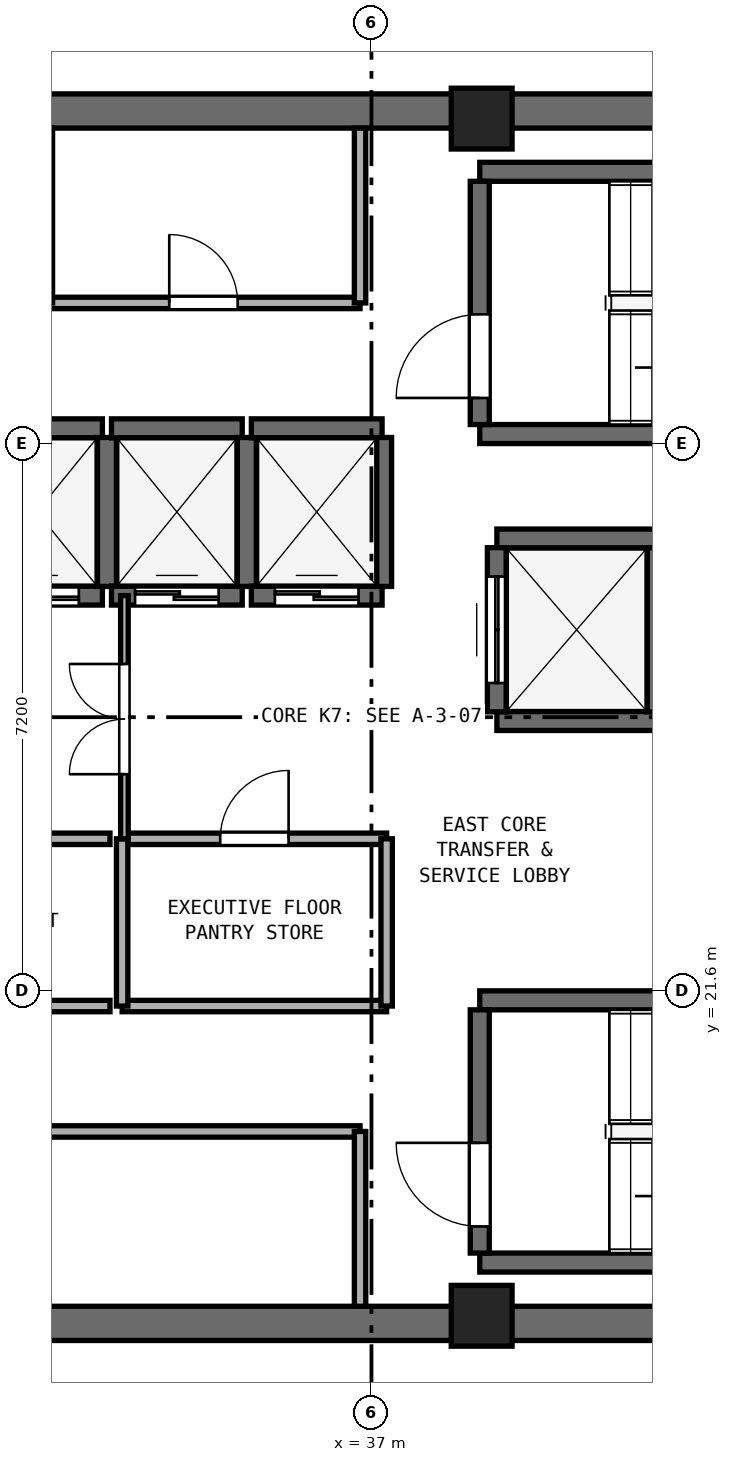
"""IFC4 building model, lengths in metres.
Left out: names, types, materials, properties, quantities, classifications, styles, units other than length and angle.
Written with IfcOpenShell. Run it as: python <this file> out.ifc"""

import sys

from ifc_helpers import new_model, si_unit, direction, frame, frame_2d, origin, origin_2d, place, context, subcontext, project, spatial, rectangle, extrude, element, fill, save


model = new_model("IFC4")
c1 = context("Model", 3, precision=1e-05, world=origin(), true_north=direction((0.0, 1.0)))
c2 = subcontext(c1, "Body", "Model", "MODEL_VIEW")
j1 = project(units=[si_unit("LENGTHUNIT", "METRE"), si_unit("PLANEANGLEUNIT", "RADIAN")], contexts=[c1])
p1 = place(None, origin())
s1 = spatial("IfcSite", under=j1, at=p1, CompositionType="ELEMENT")
p2 = place(p1, origin())
s2 = spatial("IfcBuilding", under=s1, at=p2, CompositionType="ELEMENT")
p3 = place(p2, frame((0.0, 0.0, 251.6)))
s3 = spatial("IfcBuildingStorey", under=s2, at=p3, CompositionType="ELEMENT", Elevation=251.6)
for number, where, z_axis, x_axis in (
    (1, (25.4, 17.225, 0.0), (0.0, 0.0, 1.0), (1.0, 0.0, 0.0)),
    (2, (25.4, 33.175, 0.0), (0.0, 0.0, 1.0), (1.0, 0.0, 0.0)),
):
    element("IfcWall", number, at=place(p3, frame(where, z_axis=z_axis, x_axis=x_axis)), inside=s3, PredefinedType="SHEAR", context=c2, shape_type="SweptSolid", body=[
        extrude(rectangle(XDim=23.2, YDim=0.45, at=frame_2d((11.6, 0.0))), origin(), (0.0, 0.0, 1.0), 3.51),
    ])
for number, where, z_axis, x_axis in (
    (3, (38.45, 17.325, 0.0), (0.0, 0.0, 1.0), (1.0, 0.0, 0.0)),
    (4, (38.45, 33.075, 0.0), (0.0, 0.0, 1.0), (1.0, 0.0, 0.0)),
):
    element("IfcColumn", number, at=place(p3, frame(where, z_axis=z_axis, x_axis=x_axis)), inside=s3, PredefinedType="PILASTER", context=c2, shape_type="SweptSolid", body=[
        extrude(rectangle(XDim=0.8, YDim=0.8, at=origin_2d()), origin(), (0.0, 0.0, 1.0), 3.8),
    ])
for number, where, z_axis, x_axis in (
    (5, (38.425, 28.925, 0.0), (0.0, 0.0, 1.0), (1.0, 0.0, 0.0)),
    (6, (38.425, 32.375, 0.0), (0.0, 0.0, 1.0), (1.0, 0.0, 0.0)),
):
    element("IfcWall", number, at=place(p3, frame(where, z_axis=z_axis, x_axis=x_axis)), inside=s3, PredefinedType="SHEAR", context=c2, shape_type="SweptSolid", body=[
        extrude(rectangle(XDim=7.3, YDim=0.25, at=frame_2d((3.65, 0.0))), origin(), (0.0, 0.0, 1.0), 3.51),
    ])
p4 = place(p3, frame((38.425, 29.05, 0.0), z_axis=(0.0, 0.0, 1.0), x_axis=(0.0, 1.0, 0.0)))
e7 = element("IfcWall", 7, at=p4, inside=s3, PredefinedType="SHEAR", context=c2, shape_type="SweptSolid", body=[
    extrude(rectangle(XDim=3.2, YDim=0.25, at=frame_2d((1.6, 0.0))), origin(), (0.0, 0.0, 1.0), 3.51),
])
p5 = place(p4, frame((0.35, 0.0, 0.0)))
e8 = element("IfcOpeningElement", 8, at=p5, cuts=e7, PredefinedType="OPENING", context=c2, shape_type="SweptSolid", body=[
    extrude(rectangle(XDim=1.1, YDim=2.15, at=frame_2d((0.55, 1.075))), frame((0.0, 0.135, 0.0), z_axis=(0.0, -1.0, 0.0), x_axis=(1.0, 0.0, 0.0)), (0.0, 0.0, 1.0), 0.27),
])
for number, where, z_axis, x_axis in (
    (9, (38.425, 18.025, 0.0), (0.0, 0.0, 1.0), (1.0, 0.0, 0.0)),
    (10, (38.425, 21.475, 0.0), (0.0, 0.0, 1.0), (1.0, 0.0, 0.0)),
):
    element("IfcWall", number, at=place(p3, frame(where, z_axis=z_axis, x_axis=x_axis)), inside=s3, PredefinedType="SHEAR", context=c2, shape_type="SweptSolid", body=[
        extrude(rectangle(XDim=7.3, YDim=0.25, at=frame_2d((3.65, 0.0))), origin(), (0.0, 0.0, 1.0), 3.51),
    ])
p6 = place(p3, frame((38.425, 18.15, 0.0), z_axis=(0.0, 0.0, 1.0), x_axis=(0.0, 1.0, 0.0)))
e11 = element("IfcWall", 11, at=p6, inside=s3, PredefinedType="SHEAR", context=c2, shape_type="SweptSolid", body=[
    extrude(rectangle(XDim=3.2, YDim=0.25, at=frame_2d((1.6, 0.0))), origin(), (0.0, 0.0, 1.0), 3.51),
])
p7 = place(p6, frame((0.35, 0.0, 0.0)))
e12 = element("IfcOpeningElement", 12, at=p7, cuts=e11, PredefinedType="OPENING", context=c2, shape_type="SweptSolid", body=[
    extrude(rectangle(XDim=1.1, YDim=2.15, at=frame_2d((0.55, 1.075))), frame((0.0, 0.135, 0.0), z_axis=(0.0, -1.0, 0.0), x_axis=(1.0, 0.0, 0.0)), (0.0, 0.0, 1.0), 0.27),
])
p8 = place(p3, frame((31.74, 26.8, 0.0), z_axis=(0.0, 0.0, 1.0), x_axis=(1.0, 0.0, 0.0)))
e13 = element("IfcWall", 13, at=p8, inside=s3, PredefinedType="SHEAR", context=c2, shape_type="SweptSolid", body=[
    extrude(rectangle(XDim=1.72, YDim=0.25, at=frame_2d((0.86, 0.0))), origin(), (0.0, 0.0, 1.0), 3.51),
])
p9 = place(p8, frame((0.31, 0.0, 0.0)))
e14 = element("IfcOpeningElement", 14, at=p9, cuts=e13, PredefinedType="OPENING", context=c2, shape_type="SweptSolid", body=[
    extrude(rectangle(XDim=1.1, YDim=2.15, at=frame_2d((0.55, 1.075))), frame((0.0, 0.135, 0.0), z_axis=(0.0, -1.0, 0.0), x_axis=(1.0, 0.0, 0.0)), (0.0, 0.0, 1.0), 0.27),
])
p10 = place(p3, frame((31.74, 29.0, 0.0), z_axis=(0.0, 0.0, 1.0), x_axis=(1.0, 0.0, 0.0)))
e15 = element("IfcWall", 15, at=p10, inside=s3, PredefinedType="SHEAR", context=c2, shape_type="SweptSolid", body=[
    extrude(rectangle(XDim=1.72, YDim=0.25, at=frame_2d((0.86, 0.0))), origin(), (0.0, 0.0, 1.0), 3.51),
])
p11 = place(p3, frame((33.52, 26.92, 0.0), z_axis=(0.0, 0.0, 1.0), x_axis=(0.0, 1.0, 0.0)))
e16 = element("IfcWall", 16, at=p11, inside=s3, PredefinedType="SHEAR", context=c2, shape_type="SweptSolid", body=[
    extrude(rectangle(XDim=1.96, YDim=0.25, at=frame_2d((0.98, 0.0))), origin(), (0.0, 0.0, 1.0), 3.51),
])
p12 = place(p3, frame((33.58, 26.8, 0.0), z_axis=(0.0, 0.0, 1.0), x_axis=(1.0, 0.0, 0.0)))
e17 = element("IfcWall", 17, at=p12, inside=s3, PredefinedType="SHEAR", context=c2, shape_type="SweptSolid", body=[
    extrude(rectangle(XDim=1.72, YDim=0.25, at=frame_2d((0.86, 0.0))), origin(), (0.0, 0.0, 1.0), 3.51),
])
p13 = place(p12, frame((0.31, 0.0, 0.0)))
e18 = element("IfcOpeningElement", 18, at=p13, cuts=e17, PredefinedType="OPENING", context=c2, shape_type="SweptSolid", body=[
    extrude(rectangle(XDim=1.1, YDim=2.15, at=frame_2d((0.55, 1.075))), frame((0.0, 0.135, 0.0), z_axis=(0.0, -1.0, 0.0), x_axis=(1.0, 0.0, 0.0)), (0.0, 0.0, 1.0), 0.27),
])
p14 = place(p3, frame((33.58, 29.0, 0.0), z_axis=(0.0, 0.0, 1.0), x_axis=(1.0, 0.0, 0.0)))
e19 = element("IfcWall", 19, at=p14, inside=s3, PredefinedType="SHEAR", context=c2, shape_type="SweptSolid", body=[
    extrude(rectangle(XDim=1.72, YDim=0.25, at=frame_2d((0.86, 0.0))), origin(), (0.0, 0.0, 1.0), 3.51),
])
p15 = place(p3, frame((35.36, 26.92, 0.0), z_axis=(0.0, 0.0, 1.0), x_axis=(0.0, 1.0, 0.0)))
e20 = element("IfcWall", 20, at=p15, inside=s3, PredefinedType="SHEAR", context=c2, shape_type="SweptSolid", body=[
    extrude(rectangle(XDim=1.96, YDim=0.25, at=frame_2d((0.98, 0.0))), origin(), (0.0, 0.0, 1.0), 3.51),
])
p16 = place(p3, frame((35.42, 26.8, 0.0), z_axis=(0.0, 0.0, 1.0), x_axis=(1.0, 0.0, 0.0)))
e21 = element("IfcWall", 21, at=p16, inside=s3, PredefinedType="SHEAR", context=c2, shape_type="SweptSolid", body=[
    extrude(rectangle(XDim=1.72, YDim=0.25, at=frame_2d((0.86, 0.0))), origin(), (0.0, 0.0, 1.0), 3.51),
])
p17 = place(p16, frame((0.31, 0.0, 0.0)))
e22 = element("IfcOpeningElement", 22, at=p17, cuts=e21, PredefinedType="OPENING", context=c2, shape_type="SweptSolid", body=[
    extrude(rectangle(XDim=1.1, YDim=2.15, at=frame_2d((0.55, 1.075))), frame((0.0, 0.135, 0.0), z_axis=(0.0, -1.0, 0.0), x_axis=(1.0, 0.0, 0.0)), (0.0, 0.0, 1.0), 0.27),
])
p18 = place(p3, frame((35.42, 29.0, 0.0), z_axis=(0.0, 0.0, 1.0), x_axis=(1.0, 0.0, 0.0)))
e23 = element("IfcWall", 23, at=p18, inside=s3, PredefinedType="SHEAR", context=c2, shape_type="SweptSolid", body=[
    extrude(rectangle(XDim=1.72, YDim=0.25, at=frame_2d((0.86, 0.0))), origin(), (0.0, 0.0, 1.0), 3.51),
])
p19 = place(p3, frame((37.14, 26.92, 0.0), z_axis=(0.0, 0.0, 1.0), x_axis=(0.0, 1.0, 0.0)))
e24 = element("IfcWall", 24, at=p19, inside=s3, PredefinedType="SHEAR", context=c2, shape_type="SweptSolid", body=[
    extrude(rectangle(XDim=1.96, YDim=0.25, at=frame_2d((0.98, 0.0))), origin(), (0.0, 0.0, 1.0), 3.51),
])
for number, where, z_axis, x_axis in (
    (25, (38.65, 25.15, 0.0), (0.0, 0.0, 1.0), (1.0, 0.0, 0.0)),
    (26, (38.65, 27.55, 0.0), (0.0, 0.0, 1.0), (1.0, 0.0, 0.0)),
):
    element("IfcWall", number, at=place(p3, frame(where, z_axis=z_axis, x_axis=x_axis)), inside=s3, PredefinedType="SHEAR", context=c2, shape_type="SweptSolid", body=[
        extrude(rectangle(XDim=2.1, YDim=0.25, at=frame_2d((1.05, 0.0))), origin(), (0.0, 0.0, 1.0), 3.51),
    ])
p20 = place(p3, frame((38.65, 25.27, 0.0), z_axis=(0.0, 0.0, 1.0), x_axis=(0.0, 1.0, 0.0)))
e27 = element("IfcWall", 27, at=p20, inside=s3, PredefinedType="SHEAR", context=c2, shape_type="SweptSolid", body=[
    extrude(rectangle(XDim=2.16, YDim=0.25, at=frame_2d((1.08, 0.0))), origin(), (0.0, 0.0, 1.0), 3.51),
])
p21 = place(p20, frame((0.38, 0.0, 0.0)))
e28 = element("IfcOpeningElement", 28, at=p21, cuts=e27, PredefinedType="OPENING", context=c2, shape_type="SweptSolid", body=[
    extrude(rectangle(XDim=1.4, YDim=2.2, at=frame_2d((0.7, 1.1))), frame((0.0, 0.135, 0.0), z_axis=(0.0, -1.0, 0.0), x_axis=(1.0, 0.0, 0.0)), (0.0, 0.0, 1.0), 0.27),
])
p22 = place(p3, frame((40.75, 25.27, 0.0), z_axis=(0.0, 0.0, 1.0), x_axis=(0.0, 1.0, 0.0)))
e29 = element("IfcWall", 29, at=p22, inside=s3, PredefinedType="SHEAR", context=c2, shape_type="SweptSolid", body=[
    extrude(rectangle(XDim=2.16, YDim=0.25, at=frame_2d((1.08, 0.0))), origin(), (0.0, 0.0, 1.0), 3.51),
])
p23 = place(p3, frame((32.73, 30.65, 0.0), z_axis=(0.0, 0.0, 1.0), x_axis=(1.0, 0.0, 0.0)))
e30 = element("IfcWall", 30, at=p23, inside=s3, PredefinedType="PARTITIONING", context=c2, shape_type="SweptSolid", body=[
    extrude(rectangle(XDim=4.12, YDim=0.15, at=frame_2d((2.06, 0.0))), origin(), (0.0, 0.0, 1.0), 3.51),
])
p24 = place(p23, frame((1.61, 0.0, 0.0)))
e31 = element("IfcOpeningElement", 31, at=p24, cuts=e30, PredefinedType="OPENING", context=c2, shape_type="SweptSolid", body=[
    extrude(rectangle(XDim=0.9, YDim=2.1, at=frame_2d((0.45, 1.05))), frame((0.0, 0.085, 0.0), z_axis=(0.0, -1.0, 0.0), x_axis=(1.0, 0.0, 0.0)), (0.0, 0.0, 1.0), 0.17),
])
for number, where, z_axis, x_axis in (
    (32, (32.73, 30.65, 0.0), (0.0, 0.0, 1.0), (0.0, 1.0, 0.0)),
    (33, (36.85, 30.65, 0.0), (0.0, 0.0, 1.0), (0.0, 1.0, 0.0)),
):
    element("IfcWall", number, at=place(p3, frame(where, z_axis=z_axis, x_axis=x_axis)), inside=s3, PredefinedType="PARTITIONING", context=c2, shape_type="SweptSolid", body=[
        extrude(rectangle(XDim=2.3, YDim=0.15, at=frame_2d((1.15, 0.0))), origin(), (0.0, 0.0, 1.0), 3.51),
    ])
p25 = place(p3, frame((25.97, 19.75, 0.0), z_axis=(0.0, 0.0, 1.0), x_axis=(1.0, 0.0, 0.0)))
e34 = element("IfcWall", 34, at=p25, inside=s3, PredefinedType="PARTITIONING", context=c2, shape_type="SweptSolid", body=[
    extrude(rectangle(XDim=10.88, YDim=0.15, at=frame_2d((5.44, 0.0))), origin(), (0.0, 0.0, 1.0), 3.51),
])
p26 = place(p25, frame((4.965, 0.0, 0.0)))
e35 = element("IfcOpeningElement", 35, at=p26, cuts=e34, PredefinedType="OPENING", context=c2, shape_type="SweptSolid", body=[
    extrude(rectangle(XDim=0.95, YDim=2.1, at=frame_2d((0.475, 1.05))), frame((0.0, 0.085, 0.0), z_axis=(0.0, -1.0, 0.0), x_axis=(1.0, 0.0, 0.0)), (0.0, 0.0, 1.0), 0.17),
])
p27 = place(p3, frame((36.85, 17.45, 0.0), z_axis=(0.0, 0.0, 1.0), x_axis=(0.0, 1.0, 0.0)))
e36 = element("IfcWall", 36, at=p27, inside=s3, PredefinedType="PARTITIONING", context=c2, shape_type="SweptSolid", body=[
    extrude(rectangle(XDim=2.3, YDim=0.15, at=frame_2d((1.15, 0.0))), origin(), (0.0, 0.0, 1.0), 3.51),
])
p28 = place(p3, frame((30.08, 21.4, 0.0), z_axis=(0.0, 0.0, 1.0), x_axis=(1.0, 0.0, 0.0)))
e37 = element("IfcWall", 37, at=p28, inside=s3, PredefinedType="PARTITIONING", context=c2, shape_type="SweptSolid", body=[
    extrude(rectangle(XDim=3.48, YDim=0.15, at=frame_2d((1.74, 0.0))), origin(), (0.0, 0.0, 1.0), 3.51),
])
p29 = place(p3, frame((30.08, 23.6, 0.0), z_axis=(0.0, 0.0, 1.0), x_axis=(1.0, 0.0, 0.0)))
e38 = element("IfcWall", 38, at=p29, inside=s3, PredefinedType="PARTITIONING", context=c2, shape_type="SweptSolid", body=[
    extrude(rectangle(XDim=3.48, YDim=0.15, at=frame_2d((1.74, 0.0))), origin(), (0.0, 0.0, 1.0), 3.51),
])
p30 = place(p29, frame((1.29, 0.0, 0.0)))
e39 = element("IfcOpeningElement", 39, at=p30, cuts=e38, PredefinedType="OPENING", context=c2, shape_type="SweptSolid", body=[
    extrude(rectangle(XDim=0.9, YDim=2.1, at=frame_2d((0.45, 1.05))), frame((0.0, 0.085, 0.0), z_axis=(0.0, -1.0, 0.0), x_axis=(1.0, 0.0, 0.0)), (0.0, 0.0, 1.0), 0.17),
])
p31 = place(p3, frame((33.72, 21.4, 0.0), z_axis=(0.0, 0.0, 1.0), x_axis=(1.0, 0.0, 0.0)))
e40 = element("IfcWall", 40, at=p31, inside=s3, PredefinedType="PARTITIONING", context=c2, shape_type="SweptSolid", body=[
    extrude(rectangle(XDim=3.48, YDim=0.15, at=frame_2d((1.74, 0.0))), origin(), (0.0, 0.0, 1.0), 3.51),
])
p32 = place(p3, frame((33.72, 23.6, 0.0), z_axis=(0.0, 0.0, 1.0), x_axis=(1.0, 0.0, 0.0)))
e41 = element("IfcWall", 41, at=p32, inside=s3, PredefinedType="PARTITIONING", context=c2, shape_type="SweptSolid", body=[
    extrude(rectangle(XDim=3.48, YDim=0.15, at=frame_2d((1.74, 0.0))), origin(), (0.0, 0.0, 1.0), 3.51),
])
p33 = place(p32, frame((1.29, 0.0, 0.0)))
e42 = element("IfcOpeningElement", 42, at=p33, cuts=e41, PredefinedType="OPENING", context=c2, shape_type="SweptSolid", body=[
    extrude(rectangle(XDim=0.9, YDim=2.1, at=frame_2d((0.45, 1.05))), frame((0.0, 0.085, 0.0), z_axis=(0.0, -1.0, 0.0), x_axis=(1.0, 0.0, 0.0)), (0.0, 0.0, 1.0), 0.17),
])
for number, where, z_axis, x_axis in (
    (43, (33.72, 21.4, 0.0), (0.0, 0.0, 1.0), (0.0, 1.0, 0.0)),
    (44, (37.2, 21.4, 0.0), (0.0, 0.0, 1.0), (0.0, 1.0, 0.0)),
):
    element("IfcWall", number, at=place(p3, frame(where, z_axis=z_axis, x_axis=x_axis)), inside=s3, PredefinedType="PARTITIONING", context=c2, shape_type="SweptSolid", body=[
        extrude(rectangle(XDim=2.2, YDim=0.15, at=frame_2d((1.1, 0.0))), origin(), (0.0, 0.0, 1.0), 3.51),
    ])
p34 = place(p3, frame((33.75, 23.6, 0.0), z_axis=(0.0, 0.0, 1.0), x_axis=(0.0, 1.0, 0.0)))
e45 = element("IfcWall", 45, at=p34, inside=s3, PredefinedType="PARTITIONING", context=c2, shape_type="SweptSolid", body=[
    extrude(rectangle(XDim=3.2, YDim=0.1, at=frame_2d((1.6, 0.0))), origin(), (0.0, 0.0, 1.0), 3.51),
])
p35 = place(p34, frame((0.85, 0.0, 0.0)))
e46 = element("IfcOpeningElement", 46, at=p35, cuts=e45, PredefinedType="OPENING", context=c2, shape_type="SweptSolid", body=[
    extrude(rectangle(XDim=1.45, YDim=2.12, at=frame_2d((0.725, 1.06))), frame((0.0, 0.06, 0.0), z_axis=(0.0, -1.0, 0.0), x_axis=(1.0, 0.0, 0.0)), (0.0, 0.0, 1.0), 0.12),
])
p36 = place(p5, origin())
e47 = element("IfcDoor", 47, at=p36, inside=s3, OperationType="SINGLE_SWING_LEFT", PredefinedType="DOOR", context=c2, shape_type="SweptSolid", body=[
    extrude(rectangle(XDim=1.1, YDim=2.15, at=frame_2d((0.55, 1.075))), frame((0.0, 0.025, 0.0), z_axis=(0.0, -1.0, 0.0), x_axis=(1.0, 0.0, 0.0)), (0.0, 0.0, 1.0), 0.05),
])
fill(e8, e47)
p37 = place(p7, origin())
e48 = element("IfcDoor", 48, at=p37, inside=s3, OperationType="SINGLE_SWING_RIGHT", PredefinedType="DOOR", context=c2, shape_type="SweptSolid", body=[
    extrude(rectangle(XDim=1.1, YDim=2.15, at=frame_2d((0.55, 1.075))), frame((0.0, 0.025, 0.0), z_axis=(0.0, -1.0, 0.0), x_axis=(1.0, 0.0, 0.0)), (0.0, 0.0, 1.0), 0.05),
])
fill(e12, e48)
p38 = place(p9, origin())
e49 = element("IfcDoor", 49, at=p38, inside=s3, OperationType="DOUBLE_DOOR_SLIDING", PredefinedType="DOOR", context=c2, shape_type="SweptSolid", body=[
    extrude(rectangle(XDim=1.1, YDim=2.15, at=frame_2d((0.55, 1.075))), frame((0.0, 0.025, 0.0), z_axis=(0.0, -1.0, 0.0), x_axis=(1.0, 0.0, 0.0)), (0.0, 0.0, 1.0), 0.05),
])
fill(e14, e49)
p39 = place(p13, origin())
e50 = element("IfcDoor", 50, at=p39, inside=s3, OperationType="DOUBLE_DOOR_SLIDING", PredefinedType="DOOR", context=c2, shape_type="SweptSolid", body=[
    extrude(rectangle(XDim=1.1, YDim=2.15, at=frame_2d((0.55, 1.075))), frame((0.0, 0.025, 0.0), z_axis=(0.0, -1.0, 0.0), x_axis=(1.0, 0.0, 0.0)), (0.0, 0.0, 1.0), 0.05),
])
fill(e18, e50)
p40 = place(p17, origin())
e51 = element("IfcDoor", 51, at=p40, inside=s3, OperationType="DOUBLE_DOOR_SLIDING", PredefinedType="DOOR", context=c2, shape_type="SweptSolid", body=[
    extrude(rectangle(XDim=1.1, YDim=2.15, at=frame_2d((0.55, 1.075))), frame((0.0, 0.025, 0.0), z_axis=(0.0, -1.0, 0.0), x_axis=(1.0, 0.0, 0.0)), (0.0, 0.0, 1.0), 0.05),
])
fill(e22, e51)
p41 = place(p21, origin())
e52 = element("IfcDoor", 52, at=p41, inside=s3, OperationType="DOUBLE_DOOR_SLIDING", PredefinedType="DOOR", context=c2, shape_type="SweptSolid", body=[
    extrude(rectangle(XDim=1.4, YDim=2.2, at=frame_2d((0.7, 1.1))), frame((0.0, 0.025, 0.0), z_axis=(0.0, -1.0, 0.0), x_axis=(1.0, 0.0, 0.0)), (0.0, 0.0, 1.0), 0.05),
])
fill(e28, e52)
p42 = place(p24, origin())
e53 = element("IfcDoor", 53, at=p42, inside=s3, OperationType="SINGLE_SWING_LEFT", PredefinedType="DOOR", context=c2, shape_type="SweptSolid", body=[
    extrude(rectangle(XDim=0.9, YDim=2.1, at=frame_2d((0.45, 1.05))), frame((0.0, 0.025, 0.0), z_axis=(0.0, -1.0, 0.0), x_axis=(1.0, 0.0, 0.0)), (0.0, 0.0, 1.0), 0.05),
])
fill(e31, e53)
p43 = place(p33, origin())
e54 = element("IfcDoor", 54, at=p43, inside=s3, OperationType="SINGLE_SWING_RIGHT", PredefinedType="DOOR", context=c2, shape_type="SweptSolid", body=[
    extrude(rectangle(XDim=0.9, YDim=2.1, at=frame_2d((0.45, 1.05))), frame((0.0, 0.025, 0.0), z_axis=(0.0, -1.0, 0.0), x_axis=(1.0, 0.0, 0.0)), (0.0, 0.0, 1.0), 0.05),
])
fill(e42, e54)
p44 = place(p35, origin())
e55 = element("IfcDoor", 55, at=p44, inside=s3, OperationType="DOUBLE_DOOR_SINGLE_SWING", PredefinedType="DOOR", context=c2, shape_type="SweptSolid", body=[
    extrude(rectangle(XDim=1.45, YDim=2.12, at=frame_2d((0.725, 1.06))), frame((0.0, 0.025, 0.0), z_axis=(0.0, -1.0, 0.0), x_axis=(1.0, 0.0, 0.0)), (0.0, 0.0, 1.0), 0.05),
])
fill(e46, e55)
save(model, sys.argv[1])
